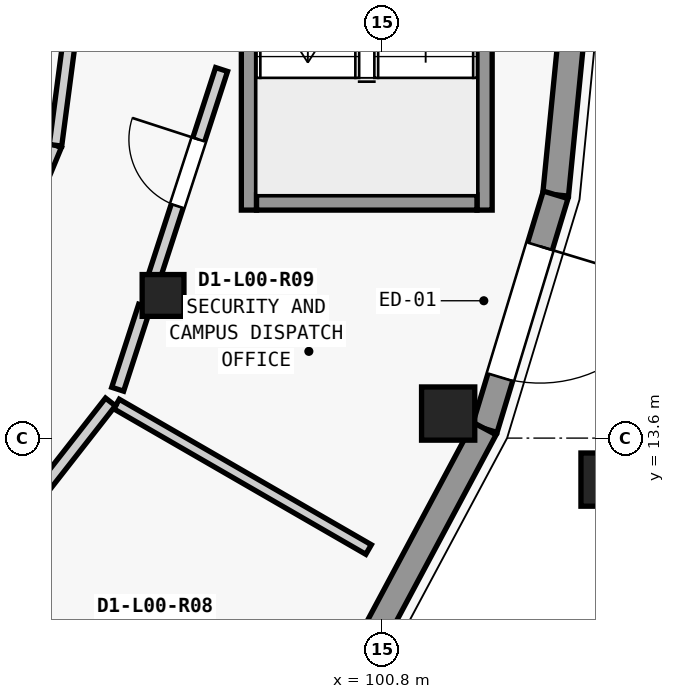
"""IFC4 building model, lengths in metres.
Left out: names, types, materials, properties, quantities, classifications, styles, units other than length and angle.
Written with IfcOpenShell. Run it as: python <this file> out.ifc"""

import sys

from ifc_helpers import new_model, si_unit, direction, frame, frame_2d, origin, origin_2d, place, context, subcontext, project, spatial, rectangle, circle, extrude, element, fill, save


model = new_model("IFC4")
c1 = context("Model", 3, precision=1e-05, world=origin(), true_north=direction((0.0, 1.0)))
c2 = subcontext(c1, "Body", "Model", "MODEL_VIEW")
j1 = project(units=[si_unit("LENGTHUNIT", "METRE"), si_unit("PLANEANGLEUNIT", "RADIAN")], contexts=[c1])
p1 = place(None, origin())
s1 = spatial("IfcSite", under=j1, at=p1, CompositionType="ELEMENT")
p2 = place(p1, origin())
s2 = spatial("IfcBuilding", under=s1, at=p2, CompositionType="ELEMENT")
p3 = place(p2, origin())
s3 = spatial("IfcBuildingStorey", under=s2, at=p3, CompositionType="ELEMENT", Elevation=0.0)
p4 = place(p3, frame((101.671, 13.923, 0.0), z_axis=(0.0, 0.0, 1.0), x_axis=(1.0, 0.0, 0.0)))
e1 = element("IfcColumn", 1, at=p4, inside=s3, PredefinedType="COLUMN", context=c2, shape_type="SweptSolid", body=[
    extrude(circle(Radius=0.35, at=origin_2d()), origin(), (0.0, 0.0, 1.0), 4.55),
])
p5 = place(p3, frame((97.92, 15.477, 0.0), z_axis=(0.0, 0.0, 1.0), x_axis=(1.0, 0.0, 0.0)))
e2 = element("IfcColumn", 2, at=p5, inside=s3, PredefinedType="COLUMN", context=c2, shape_type="SweptSolid", body=[
    extrude(rectangle(XDim=0.55, YDim=0.55, at=origin_2d()), origin(), (0.0, 0.0, 1.0), 4.55),
])
p6 = place(p3, frame((103.768, 13.054, 0.0), z_axis=(0.0, 0.0, 1.0), x_axis=(1.0, 0.0, 0.0)))
e3 = element("IfcColumn", 3, at=p6, inside=s3, PredefinedType="COLUMN", context=c2, shape_type="SweptSolid", body=[
    extrude(circle(Radius=0.35, at=origin_2d()), origin(), (0.0, 0.0, 1.0), 4.55),
])
p7 = place(p3, frame((103.4, 20.0, 0.0), z_axis=(0.0, 0.0, 1.0), x_axis=(-0.097977057849, -0.995188673637, 0.0)))
e4 = element("IfcWall", 4, at=p7, inside=s3, PredefinedType="SOLIDWALL", context=c2, shape_type="SweptSolid", body=[
    extrude(rectangle(XDim=3.214, YDim=0.34, at=frame_2d((1.607, 0.0))), origin(), (0.0, 0.0, 1.0), 3.659),
])
p8 = place(p3, frame((103.085, 16.801, 0.0), z_axis=(0.0, 0.0, 1.0), x_axis=(-0.29014016356, -0.956984161567, 0.0)))
e5 = element("IfcWall", 5, at=p8, inside=s3, PredefinedType="SOLIDWALL", context=c2, shape_type="SweptSolid", body=[
    extrude(rectangle(XDim=3.215, YDim=0.34, at=frame_2d((1.607, 0.0))), origin(), (0.0, 0.0, 1.0), 3.659),
])
p9 = place(p8, frame((0.708, 0.0, 0.0)))
e6 = element("IfcOpeningElement", 6, at=p9, cuts=e5, PredefinedType="OPENING", context=c2, shape_type="SweptSolid", body=[
    extrude(rectangle(XDim=1.8, YDim=2.55, at=frame_2d((0.9, 1.275))), frame((0.0, 0.18, 0.0), z_axis=(0.0, -1.0, 0.0), x_axis=(1.0, 0.0, 0.0)), (0.0, 0.0, 1.0), 0.36),
])
p10 = place(p3, frame((102.152, 13.724, 0.0), z_axis=(0.0, 0.0, 1.0), x_axis=(-0.47155750426, -0.881835313523, 0.0)))
e7 = element("IfcWall", 7, at=p10, inside=s3, PredefinedType="SOLIDWALL", context=c2, shape_type="SweptSolid", body=[
    extrude(rectangle(XDim=3.215, YDim=0.34, at=frame_2d((1.607, 0.0))), origin(), (0.0, 0.0, 1.0), 3.659),
])
p11 = place(p3, frame((99.05, 23.4, 0.0), z_axis=(0.0, 0.0, 1.0), x_axis=(0.0, -1.0, 0.0)))
e8 = element("IfcWall", 8, at=p11, inside=s3, PredefinedType="SHEAR", context=c2, shape_type="SweptSolid", body=[
    extrude(rectangle(XDim=6.8, YDim=0.2, at=frame_2d((3.4, 0.0))), origin(), (0.0, 0.0, 1.0), 4.305),
])
p12 = place(p11, frame((0.38, 0.0, 0.0)))
e9 = element("IfcOpeningElement", 9, at=p12, cuts=e8, PredefinedType="OPENING", context=c2, shape_type="SweptSolid", body=[
    extrude(rectangle(XDim=1.05, YDim=2.15, at=frame_2d((0.525, 1.075))), frame((0.0, 0.11, 0.0), z_axis=(0.0, -1.0, 0.0), x_axis=(1.0, 0.0, 0.0)), (0.0, 0.0, 1.0), 0.22),
])
p13 = place(p3, frame((102.15, 23.4, 0.0), z_axis=(0.0, 0.0, 1.0), x_axis=(0.0, -1.0, 0.0)))
e10 = element("IfcWall", 10, at=p13, inside=s3, PredefinedType="SHEAR", context=c2, shape_type="SweptSolid", body=[
    extrude(rectangle(XDim=6.8, YDim=0.2, at=frame_2d((3.4, 0.0))), origin(), (0.0, 0.0, 1.0), 4.305),
])
p14 = place(p3, frame((99.15, 16.7, 0.0), z_axis=(0.0, 0.0, 1.0), x_axis=(1.0, 0.0, 0.0)))
e11 = element("IfcWall", 11, at=p14, inside=s3, PredefinedType="SHEAR", context=c2, shape_type="SweptSolid", body=[
    extrude(rectangle(XDim=2.9, YDim=0.2, at=frame_2d((1.45, 0.0))), origin(), (0.0, 0.0, 1.0), 4.305),
])
p15 = place(p3, frame((95.522, 15.08, 0.0), z_axis=(0.0, 0.0, 1.0), x_axis=(0.382704397106, 0.923870848353, 0.0)))
e12 = element("IfcWall", 12, at=p15, inside=s3, PredefinedType="PARTITIONING", context=c2, shape_type="SweptSolid", body=[
    extrude(rectangle(XDim=2.568, YDim=0.165, at=frame_2d((1.284, 0.0))), origin(), (0.0, 0.0, 1.0), 3.634),
])
p16 = place(p3, frame((96.505, 17.453, 0.0), z_axis=(0.0, 0.0, 1.0), x_axis=(0.130476636685, 0.991451384224, 0.0)))
e13 = element("IfcWall", 13, at=p16, inside=s3, PredefinedType="PARTITIONING", context=c2, shape_type="SweptSolid", body=[
    extrude(rectangle(XDim=2.569, YDim=0.165, at=frame_2d((1.285, 0.0))), origin(), (0.0, 0.0, 1.0), 3.634),
])
p17 = place(p3, frame((97.308, 14.048, 0.0), z_axis=(0.0, 0.0, 1.0), x_axis=(0.866068787954, -0.499924848885, 0.0)))
e14 = element("IfcWall", 14, at=p17, inside=s3, PredefinedType="PARTITIONING", context=c2, shape_type="SweptSolid", body=[
    extrude(rectangle(XDim=3.829, YDim=0.145, at=frame_2d((1.914, 0.0))), origin(), (0.0, 0.0, 1.0), 3.634),
])
p18 = place(p3, frame((95.509, 11.878, 0.0), z_axis=(0.0, 0.0, 1.0), x_axis=(0.616046360546, 0.787709896889, 0.0)))
e15 = element("IfcWall", 15, at=p18, inside=s3, PredefinedType="PARTITIONING", context=c2, shape_type="SweptSolid", body=[
    extrude(rectangle(XDim=2.79, YDim=0.165, at=frame_2d((1.395, 0.0))), origin(), (0.0, 0.0, 1.0), 3.634),
])
p19 = place(p3, frame((97.323, 14.243, 0.0), z_axis=(0.0, 0.0, 1.0), x_axis=(0.308889116513, 0.951098056827, 0.0)))
e16 = element("IfcWall", 16, at=p19, inside=s3, PredefinedType="PARTITIONING", context=c2, shape_type="SweptSolid", body=[
    extrude(rectangle(XDim=1.149, YDim=0.165, at=frame_2d((0.575, 0.0))), origin(), (0.0, 0.0, 1.0), 3.634),
])
p20 = place(p3, frame((97.807, 15.733, 0.0), z_axis=(0.0, 0.0, 1.0), x_axis=(0.309091869187, 0.951032184735, 0.0)))
e17 = element("IfcWall", 17, at=p20, inside=s3, PredefinedType="PARTITIONING", context=c2, shape_type="SweptSolid", body=[
    extrude(rectangle(XDim=2.857, YDim=0.165, at=frame_2d((1.428, 0.0))), origin(), (0.0, 0.0, 1.0), 3.634),
])
p21 = place(p20, frame((0.968, 0.0, 0.0)))
e18 = element("IfcOpeningElement", 18, at=p21, cuts=e17, PredefinedType="OPENING", context=c2, shape_type="SweptSolid", body=[
    extrude(rectangle(XDim=0.92, YDim=2.24, at=frame_2d((0.46, 1.12))), frame((0.0, 0.093, 0.0), z_axis=(0.0, -1.0, 0.0), x_axis=(1.0, 0.0, 0.0)), (0.0, 0.0, 1.0), 0.185),
])
p22 = place(p9, origin())
e19 = element("IfcDoor", 19, at=p22, inside=s3, OperationType="SINGLE_SWING_LEFT", PredefinedType="DOOR", context=c2, shape_type="SweptSolid", body=[
    extrude(rectangle(XDim=1.8, YDim=2.55, at=frame_2d((0.9, 1.275))), frame((0.0, 0.025, 0.0), z_axis=(0.0, -1.0, 0.0), x_axis=(1.0, 0.0, 0.0)), (0.0, 0.0, 1.0), 0.05),
])
fill(e6, e19)
p23 = place(p21, origin())
e20 = element("IfcDoor", 20, at=p23, inside=s3, OperationType="SINGLE_SWING_RIGHT", PredefinedType="DOOR", context=c2, shape_type="SweptSolid", body=[
    extrude(rectangle(XDim=0.92, YDim=2.24, at=frame_2d((0.46, 1.12))), frame((0.0, 0.025, 0.0), z_axis=(0.0, -1.0, 0.0), x_axis=(1.0, 0.0, 0.0)), (0.0, 0.0, 1.0), 0.05),
])
fill(e18, e20)
save(model, sys.argv[1])
